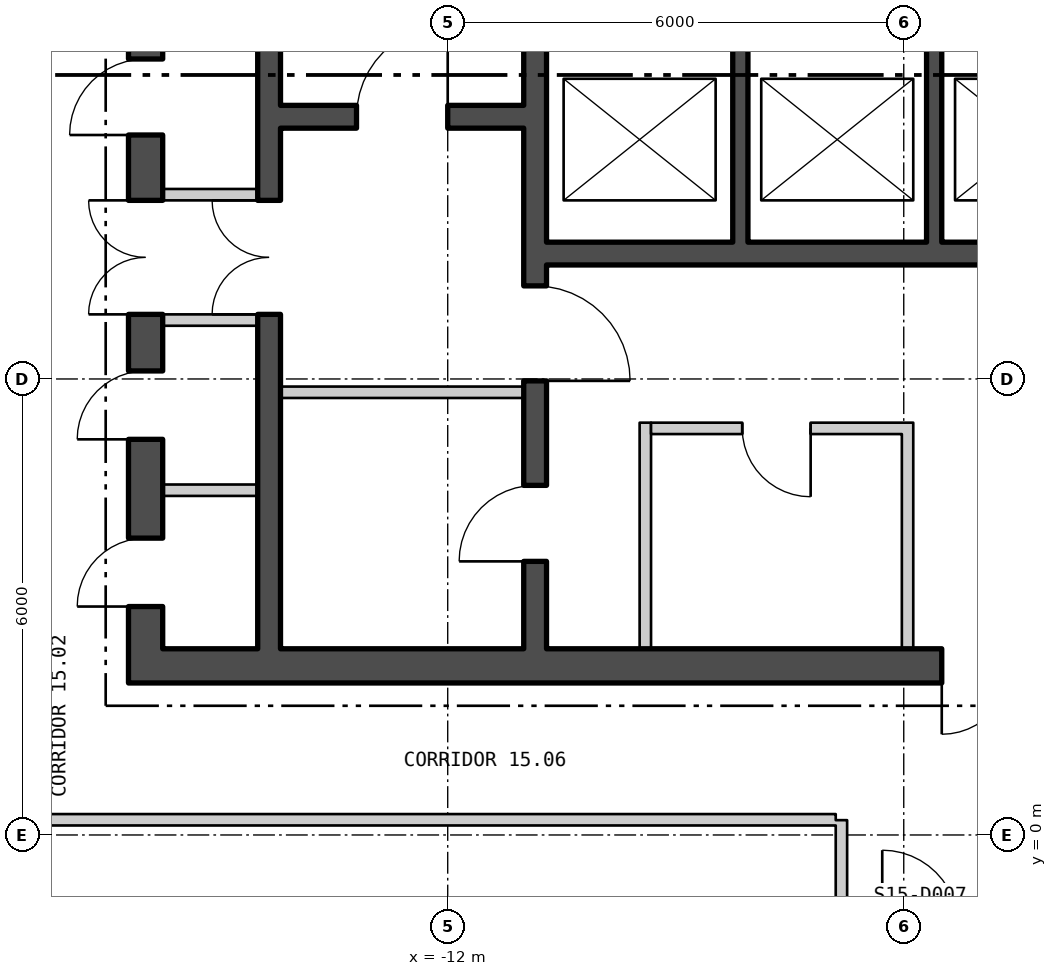
"""IFC4 building model, lengths in metres.
Left out: names, types, materials, properties, quantities, classifications, styles, units other than length and angle.
Written with IfcOpenShell. Run it as: python <this file> out.ifc"""

import sys

from ifc_helpers import new_model, si_unit, direction, frame, frame_2d, origin, place, context, subcontext, project, spatial, polyline, rectangle, outline, extrude, element, fill, save


model = new_model("IFC4")
c1 = context("Model", 3, precision=1e-05, world=origin(), true_north=direction((0.0, 1.0)))
c2 = subcontext(c1, "Body", "Model", "MODEL_VIEW")
j1 = project(units=[si_unit("LENGTHUNIT", "METRE"), si_unit("PLANEANGLEUNIT", "RADIAN")], contexts=[c1])
p1 = place(None, origin())
s1 = spatial("IfcSite", under=j1, at=p1, CompositionType="ELEMENT")
p2 = place(p1, origin())
s2 = spatial("IfcBuilding", under=s1, at=p2, CompositionType="ELEMENT")
p3 = place(p2, frame((0.0, 0.0, 204.3)))
s3 = spatial("IfcBuildingStorey", under=s2, at=p3, CompositionType="ELEMENT", Elevation=204.3)
p4 = place(p3, frame((-26.385, 13.887, -0.18), z_axis=(0.0, 0.0, 1.0), x_axis=(0.499999764979, -0.866025539474, 0.0)))
e1 = element("IfcWall", 1, at=p4, inside=s3, PredefinedType="SOLIDWALL", context=c2, shape_type="SweptSolid", body=[
    extrude(outline(polyline([(-0.13, -0.225), (45.87, -0.225), (45.61, 0.225), (0.13, 0.225), (-0.13, -0.225)])), origin(), (0.0, 0.0, 1.0), 3.68),
])
p5 = place(p4, frame((1.424, 0.0, 1.08)))
e2 = element("IfcOpeningElement", 2, at=p5, cuts=e1, PredefinedType="OPENING", context=c2, shape_type="SweptSolid", body=[
    extrude(rectangle(XDim=2.4, YDim=2.0, at=frame_2d((1.2, 1.0))), frame((0.0, 0.235, 0.0), z_axis=(0.0, -1.0, 0.0), x_axis=(1.0, 0.0, 0.0)), (0.0, 0.0, 1.0), 0.47),
])
p6 = place(p4, frame((5.893, 0.0, 1.08)))
e3 = element("IfcOpeningElement", 3, at=p6, cuts=e1, PredefinedType="OPENING", context=c2, shape_type="SweptSolid", body=[
    extrude(rectangle(XDim=2.4, YDim=2.0, at=frame_2d((1.2, 1.0))), frame((0.0, 0.235, 0.0), z_axis=(0.0, -1.0, 0.0), x_axis=(1.0, 0.0, 0.0)), (0.0, 0.0, 1.0), 0.47),
])
p7 = place(p4, frame((10.401, 0.0, 1.08)))
e4 = element("IfcOpeningElement", 4, at=p7, cuts=e1, PredefinedType="OPENING", context=c2, shape_type="SweptSolid", body=[
    extrude(rectangle(XDim=2.4, YDim=2.0, at=frame_2d((1.2, 1.0))), frame((0.0, 0.235, 0.0), z_axis=(0.0, -1.0, 0.0), x_axis=(1.0, 0.0, 0.0)), (0.0, 0.0, 1.0), 0.47),
])
p8 = place(p4, frame((14.909, 0.0, 1.08)))
e5 = element("IfcOpeningElement", 5, at=p8, cuts=e1, PredefinedType="OPENING", context=c2, shape_type="SweptSolid", body=[
    extrude(rectangle(XDim=2.4, YDim=2.0, at=frame_2d((1.2, 1.0))), frame((0.0, 0.235, 0.0), z_axis=(0.0, -1.0, 0.0), x_axis=(1.0, 0.0, 0.0)), (0.0, 0.0, 1.0), 0.47),
])
p9 = place(p4, frame((19.416, 0.0, 1.08)))
e6 = element("IfcOpeningElement", 6, at=p9, cuts=e1, PredefinedType="OPENING", context=c2, shape_type="SweptSolid", body=[
    extrude(rectangle(XDim=2.4, YDim=2.0, at=frame_2d((1.2, 1.0))), frame((0.0, 0.235, 0.0), z_axis=(0.0, -1.0, 0.0), x_axis=(1.0, 0.0, 0.0)), (0.0, 0.0, 1.0), 0.47),
])
p10 = place(p4, frame((23.924, 0.0, 1.08)))
e7 = element("IfcOpeningElement", 7, at=p10, cuts=e1, PredefinedType="OPENING", context=c2, shape_type="SweptSolid", body=[
    extrude(rectangle(XDim=2.4, YDim=2.0, at=frame_2d((1.2, 1.0))), frame((0.0, 0.235, 0.0), z_axis=(0.0, -1.0, 0.0), x_axis=(1.0, 0.0, 0.0)), (0.0, 0.0, 1.0), 0.47),
])
p11 = place(p4, frame((28.431, 0.0, 1.08)))
e8 = element("IfcOpeningElement", 8, at=p11, cuts=e1, PredefinedType="OPENING", context=c2, shape_type="SweptSolid", body=[
    extrude(rectangle(XDim=2.4, YDim=2.0, at=frame_2d((1.2, 1.0))), frame((0.0, 0.235, 0.0), z_axis=(0.0, -1.0, 0.0), x_axis=(1.0, 0.0, 0.0)), (0.0, 0.0, 1.0), 0.47),
])
p12 = place(p4, frame((32.939, 0.0, 1.08)))
e9 = element("IfcOpeningElement", 9, at=p12, cuts=e1, PredefinedType="OPENING", context=c2, shape_type="SweptSolid", body=[
    extrude(rectangle(XDim=2.4, YDim=2.0, at=frame_2d((1.2, 1.0))), frame((0.0, 0.235, 0.0), z_axis=(0.0, -1.0, 0.0), x_axis=(1.0, 0.0, 0.0)), (0.0, 0.0, 1.0), 0.47),
])
p13 = place(p4, frame((41.916, 0.0, 1.08)))
e10 = element("IfcOpeningElement", 10, at=p13, cuts=e1, PredefinedType="OPENING", context=c2, shape_type="SweptSolid", body=[
    extrude(rectangle(XDim=2.4, YDim=2.0, at=frame_2d((1.2, 1.0))), frame((0.0, 0.235, 0.0), z_axis=(0.0, -1.0, 0.0), x_axis=(1.0, 0.0, 0.0)), (0.0, 0.0, 1.0), 0.47),
])
p14 = place(p3, frame((-16.2, 2.225, 0.0), z_axis=(0.0, 0.0, 1.0), x_axis=(1.0, 0.0, 0.0)))
e11 = element("IfcWall", 11, at=p14, inside=s3, PredefinedType="SHEAR", context=c2, shape_type="SweptSolid", body=[
    extrude(rectangle(XDim=32.4, YDim=0.45, at=frame_2d((16.2, 0.0))), origin(), (0.0, 0.0, 1.0), 3.7),
])
p15 = place(p14, frame((10.7, 0.0, 0.0)))
e12 = element("IfcOpeningElement", 12, at=p15, cuts=e11, PredefinedType="OPENING", context=c2, shape_type="SweptSolid", body=[
    extrude(rectangle(XDim=1.8, YDim=2.4, at=frame_2d((0.9, 1.2))), frame((0.0, 0.235, 0.0), z_axis=(0.0, -1.0, 0.0), x_axis=(1.0, 0.0, 0.0)), (0.0, 0.0, 1.0), 0.47),
])
p16 = place(p14, frame((20.7, 0.0, 0.0)))
e13 = element("IfcOpeningElement", 13, at=p16, cuts=e11, PredefinedType="OPENING", context=c2, shape_type="SweptSolid", body=[
    extrude(rectangle(XDim=1.8, YDim=2.4, at=frame_2d((0.9, 1.2))), frame((0.0, 0.235, 0.0), z_axis=(0.0, -1.0, 0.0), x_axis=(1.0, 0.0, 0.0)), (0.0, 0.0, 1.0), 0.47),
])
p17 = place(p3, frame((-15.975, 2.45, 0.0), z_axis=(0.0, 0.0, 1.0), x_axis=(0.0, 1.0, 0.0)))
e14 = element("IfcWall", 14, at=p17, inside=s3, PredefinedType="SHEAR", context=c2, shape_type="SweptSolid", body=[
    extrude(rectangle(XDim=15.1, YDim=0.45, at=frame_2d((7.55, 0.0))), origin(), (0.0, 0.0, 1.0), 3.7),
])
p18 = place(p17, frame((4.4, 0.0, 0.0)))
e15 = element("IfcOpeningElement", 15, at=p18, cuts=e14, PredefinedType="OPENING", context=c2, shape_type="SweptSolid", body=[
    extrude(rectangle(XDim=1.5, YDim=2.1, at=frame_2d((0.75, 1.05))), frame((0.0, 0.235, 0.0), z_axis=(0.0, -1.0, 0.0), x_axis=(1.0, 0.0, 0.0)), (0.0, 0.0, 1.0), 0.47),
])
p19 = place(p17, frame((0.556, 0.0, 0.0)))
e16 = element("IfcOpeningElement", 16, at=p19, cuts=e14, PredefinedType="OPENING", context=c2, shape_type="SweptSolid", body=[
    extrude(rectangle(XDim=0.9, YDim=2.1, at=frame_2d((0.45, 1.05))), frame((0.0, 0.235, 0.0), z_axis=(0.0, -1.0, 0.0), x_axis=(1.0, 0.0, 0.0)), (0.0, 0.0, 1.0), 0.47),
])
p20 = place(p17, frame((2.756, 0.0, 0.0)))
e17 = element("IfcOpeningElement", 17, at=p20, cuts=e14, PredefinedType="OPENING", context=c2, shape_type="SweptSolid", body=[
    extrude(rectangle(XDim=0.9, YDim=2.1, at=frame_2d((0.45, 1.05))), frame((0.0, 0.235, 0.0), z_axis=(0.0, -1.0, 0.0), x_axis=(1.0, 0.0, 0.0)), (0.0, 0.0, 1.0), 0.47),
])
p21 = place(p17, frame((6.76, 0.0, 0.0)))
e18 = element("IfcOpeningElement", 18, at=p21, cuts=e14, PredefinedType="OPENING", context=c2, shape_type="SweptSolid", body=[
    extrude(rectangle(XDim=1.0, YDim=2.1, at=frame_2d((0.5, 1.05))), frame((0.0, 0.235, 0.0), z_axis=(0.0, -1.0, 0.0), x_axis=(1.0, 0.0, 0.0)), (0.0, 0.0, 1.0), 0.47),
])
p22 = place(p17, frame((10.032, 0.0, 0.0)))
e19 = element("IfcOpeningElement", 19, at=p22, cuts=e14, PredefinedType="OPENING", context=c2, shape_type="SweptSolid", body=[
    extrude(rectangle(XDim=0.9, YDim=2.1, at=frame_2d((0.45, 1.05))), frame((0.0, 0.235, 0.0), z_axis=(0.0, -1.0, 0.0), x_axis=(1.0, 0.0, 0.0)), (0.0, 0.0, 1.0), 0.47),
])
p23 = place(p17, frame((13.347, 0.0, 0.0)))
e20 = element("IfcOpeningElement", 20, at=p23, cuts=e14, PredefinedType="OPENING", context=c2, shape_type="SweptSolid", body=[
    extrude(rectangle(XDim=0.9, YDim=2.1, at=frame_2d((0.45, 1.05))), frame((0.0, 0.235, 0.0), z_axis=(0.0, -1.0, 0.0), x_axis=(1.0, 0.0, 0.0)), (0.0, 0.0, 1.0), 0.47),
])
p24 = place(p3, frame((-10.85, 2.45, 0.0), z_axis=(0.0, 0.0, 1.0), x_axis=(0.0, 1.0, 0.0)))
e21 = element("IfcWall", 21, at=p24, inside=s3, PredefinedType="SHEAR", context=c2, shape_type="SweptSolid", body=[
    extrude(rectangle(XDim=15.1, YDim=0.3, at=frame_2d((7.55, 0.0))), origin(), (0.0, 0.0, 1.0), 3.7),
])
p25 = place(p24, frame((3.525, 0.0, 0.0)))
e22 = element("IfcOpeningElement", 22, at=p25, cuts=e21, PredefinedType="OPENING", context=c2, shape_type="SweptSolid", body=[
    extrude(rectangle(XDim=1.25, YDim=2.1, at=frame_2d((0.625, 1.05))), frame((0.0, 0.16, 0.0), z_axis=(0.0, -1.0, 0.0), x_axis=(1.0, 0.0, 0.0)), (0.0, 0.0, 1.0), 0.32),
])
p26 = place(p24, frame((1.15, 0.0, 0.0)))
e23 = element("IfcOpeningElement", 23, at=p26, cuts=e21, PredefinedType="OPENING", context=c2, shape_type="SweptSolid", body=[
    extrude(rectangle(XDim=1.0, YDim=2.1, at=frame_2d((0.5, 1.05))), frame((0.0, 0.16, 0.0), z_axis=(0.0, -1.0, 0.0), x_axis=(1.0, 0.0, 0.0)), (0.0, 0.0, 1.0), 0.32),
])
p27 = place(p3, frame((-14.35, 2.45, 0.0), z_axis=(0.0, 0.0, 1.0), x_axis=(0.0, 1.0, 0.0)))
e24 = element("IfcWall", 24, at=p27, inside=s3, PredefinedType="SHEAR", context=c2, shape_type="SweptSolid", body=[
    extrude(rectangle(XDim=15.1, YDim=0.3, at=frame_2d((7.55, 0.0))), origin(), (0.0, 0.0, 1.0), 3.7),
])
p28 = place(p27, frame((4.4, 0.0, 0.0)))
e25 = element("IfcOpeningElement", 25, at=p28, cuts=e24, PredefinedType="OPENING", context=c2, shape_type="SweptSolid", body=[
    extrude(rectangle(XDim=1.5, YDim=2.1, at=frame_2d((0.75, 1.05))), frame((0.0, 0.16, 0.0), z_axis=(0.0, -1.0, 0.0), x_axis=(1.0, 0.0, 0.0)), (0.0, 0.0, 1.0), 0.32),
])
p29 = place(p3, frame((-14.2, 9.45, 0.0), z_axis=(0.0, 0.0, 1.0), x_axis=(1.0, 0.0, 0.0)))
e26 = element("IfcWall", 26, at=p29, inside=s3, PredefinedType="SHEAR", context=c2, shape_type="SweptSolid", body=[
    extrude(rectangle(XDim=3.2, YDim=0.3, at=frame_2d((1.6, 0.0))), origin(), (0.0, 0.0, 1.0), 3.7),
])
p30 = place(p29, frame((1.0, 0.0, 0.0)))
e27 = element("IfcOpeningElement", 27, at=p30, cuts=e26, PredefinedType="OPENING", context=c2, shape_type="SweptSolid", body=[
    extrude(rectangle(XDim=1.2, YDim=2.1, at=frame_2d((0.6, 1.05))), frame((0.0, 0.16, 0.0), z_axis=(0.0, -1.0, 0.0), x_axis=(1.0, 0.0, 0.0)), (0.0, 0.0, 1.0), 0.32),
])
p31 = place(p3, frame((-10.7, 7.65, 0.0), z_axis=(0.0, 0.0, 1.0), x_axis=(1.0, 0.0, 0.0)))
e28 = element("IfcWall", 28, at=p31, inside=s3, PredefinedType="SHEAR", context=c2, shape_type="SweptSolid", body=[
    extrude(rectangle(XDim=10.3, YDim=0.3, at=frame_2d((5.15, 0.0))), origin(), (0.0, 0.0, 1.0), 3.7),
])
for number, where, z_axis, x_axis in (
    (29, (-8.15, 7.8, 0.0), (0.0, 0.0, 1.0), (0.0, 1.0, 0.0)),
    (30, (-5.6, 7.8, 0.0), (0.0, 0.0, 1.0), (0.0, 1.0, 0.0)),
):
    element("IfcWall", number, at=place(p3, frame(where, z_axis=z_axis, x_axis=x_axis)), inside=s3, PredefinedType="SHEAR", context=c2, shape_type="SweptSolid", body=[
        extrude(rectangle(XDim=2.7, YDim=0.2, at=frame_2d((1.35, 0.0))), origin(), (0.0, 0.0, 1.0), 3.7),
    ])
p32 = place(p3, frame((-14.2, 5.825, 0.0), z_axis=(0.0, 0.0, 1.0), x_axis=(1.0, 0.0, 0.0)))
e31 = element("IfcWall", 31, at=p32, inside=s3, PredefinedType="PARTITIONING", context=c2, shape_type="SweptSolid", body=[
    extrude(rectangle(XDim=3.2, YDim=0.15, at=frame_2d((1.6, 0.0))), origin(), (0.0, 0.0, 1.0), 3.7),
])
for number, where, z_axis, x_axis in (
    (32, (-15.75, 6.775, 0.0), (0.0, 0.0, 1.0), (1.0, 0.0, 0.0)),
    (33, (-15.75, 8.425, 0.0), (0.0, 0.0, 1.0), (1.0, 0.0, 0.0)),
    (34, (-15.75, 4.536, 0.0), (0.0, 0.0, 1.0), (1.0, 0.0, 0.0)),
):
    element("IfcWall", number, at=place(p3, frame(where, z_axis=z_axis, x_axis=x_axis)), inside=s3, PredefinedType="PARTITIONING", context=c2, shape_type="SweptSolid", body=[
        extrude(rectangle(XDim=1.25, YDim=0.15, at=frame_2d((0.625, 0.0))), origin(), (0.0, 0.0, 1.0), 3.7),
    ])
for number, where, z_axis, x_axis in (
    (35, (-9.4, 2.45, 0.0), (0.0, 0.0, 1.0), (0.0, 1.0, 0.0)),
    (36, (-5.95, 2.45, 0.0), (0.0, 0.0, 1.0), (0.0, 1.0, 0.0)),
):
    element("IfcWall", number, at=place(p3, frame(where, z_axis=z_axis, x_axis=x_axis)), inside=s3, PredefinedType="PARTITIONING", context=c2, shape_type="SweptSolid", body=[
        extrude(rectangle(XDim=2.975, YDim=0.15, at=frame_2d((1.488, 0.0))), origin(), (0.0, 0.0, 1.0), 3.7),
    ])
p33 = place(p3, frame((-9.325, 5.35, 0.0), z_axis=(0.0, 0.0, 1.0), x_axis=(1.0, 0.0, 0.0)))
e37 = element("IfcWall", 37, at=p33, inside=s3, PredefinedType="PARTITIONING", context=c2, shape_type="SweptSolid", body=[
    extrude(rectangle(XDim=3.3, YDim=0.15, at=frame_2d((1.65, 0.0))), origin(), (0.0, 0.0, 1.0), 3.7),
])
p34 = place(p33, frame((1.2, 0.0, 0.0)))
e38 = element("IfcOpeningElement", 38, at=p34, cuts=e37, PredefinedType="OPENING", context=c2, shape_type="SweptSolid", body=[
    extrude(rectangle(XDim=0.9, YDim=2.1, at=frame_2d((0.45, 1.05))), frame((0.0, 0.085, 0.0), z_axis=(0.0, -1.0, 0.0), x_axis=(1.0, 0.0, 0.0)), (0.0, 0.0, 1.0), 0.17),
])
p35 = place(p3, frame((-17.925, 0.2, 0.0), z_axis=(0.0, 0.0, 1.0), x_axis=(1.0, 0.0, 0.0)))
e39 = element("IfcWall", 39, at=p35, inside=s3, PredefinedType="PARTITIONING", context=c2, shape_type="SweptSolid", body=[
    extrude(rectangle(XDim=11.03, YDim=0.15, at=frame_2d((5.515, 0.0))), origin(), (0.0, 0.0, 1.0), 3.7),
])
p36 = place(p3, frame((-6.82, -3.412, 0.0), z_axis=(0.0, 0.0, 1.0), x_axis=(0.0, 1.0, 0.0)))
e40 = element("IfcWall", 40, at=p36, inside=s3, PredefinedType="PARTITIONING", context=c2, shape_type="SweptSolid", body=[
    extrude(rectangle(XDim=3.607, YDim=0.15, at=frame_2d((1.804, 0.0))), origin(), (0.0, 0.0, 1.0), 3.7),
])
p37 = place(p30, origin())
e41 = element("IfcDoor", 41, at=p37, inside=s3, OperationType="SINGLE_SWING_LEFT", PredefinedType="DOOR", context=c2, shape_type="SweptSolid", body=[
    extrude(rectangle(XDim=1.2, YDim=2.1, at=frame_2d((0.6, 1.05))), frame((0.0, 0.025, 0.0), z_axis=(0.0, -1.0, 0.0), x_axis=(1.0, 0.0, 0.0)), (0.0, 0.0, 1.0), 0.05),
])
fill(e27, e41)
p38 = place(p25, origin())
e42 = element("IfcDoor", 42, at=p38, inside=s3, OperationType="SINGLE_SWING_LEFT", PredefinedType="DOOR", context=c2, shape_type="SweptSolid", body=[
    extrude(rectangle(XDim=1.25, YDim=2.1, at=frame_2d((0.625, 1.05))), frame((0.0, 0.025, 0.0), z_axis=(0.0, -1.0, 0.0), x_axis=(1.0, 0.0, 0.0)), (0.0, 0.0, 1.0), 0.05),
])
fill(e22, e42)
p39 = place(p26, origin())
e43 = element("IfcDoor", 43, at=p39, inside=s3, OperationType="SINGLE_SWING_RIGHT", PredefinedType="DOOR", context=c2, shape_type="SweptSolid", body=[
    extrude(rectangle(XDim=1.0, YDim=2.1, at=frame_2d((0.5, 1.05))), frame((0.0, 0.025, 0.0), z_axis=(0.0, -1.0, 0.0), x_axis=(1.0, 0.0, 0.0)), (0.0, 0.0, 1.0), 0.05),
])
fill(e23, e43)
p40 = place(p28, origin())
e44 = element("IfcDoor", 44, at=p40, inside=s3, OperationType="DOUBLE_DOOR_SINGLE_SWING", PredefinedType="DOOR", context=c2, shape_type="SweptSolid", body=[
    extrude(rectangle(XDim=1.5, YDim=2.1, at=frame_2d((0.75, 1.05))), frame((0.0, 0.025, 0.0), z_axis=(0.0, -1.0, 0.0), x_axis=(1.0, 0.0, 0.0)), (0.0, 0.0, 1.0), 0.05),
])
fill(e25, e44)
p41 = place(p18, origin())
e45 = element("IfcDoor", 45, at=p41, inside=s3, OperationType="DOUBLE_DOOR_SINGLE_SWING", PredefinedType="DOOR", context=c2, shape_type="SweptSolid", body=[
    extrude(rectangle(XDim=1.5, YDim=2.1, at=frame_2d((0.75, 1.05))), frame((0.0, 0.025, 0.0), z_axis=(0.0, -1.0, 0.0), x_axis=(1.0, 0.0, 0.0)), (0.0, 0.0, 1.0), 0.05),
])
fill(e15, e45)
p42 = place(p19, origin())
e46 = element("IfcDoor", 46, at=p42, inside=s3, OperationType="SINGLE_SWING_RIGHT", PredefinedType="DOOR", context=c2, shape_type="SweptSolid", body=[
    extrude(rectangle(XDim=0.9, YDim=2.1, at=frame_2d((0.45, 1.05))), frame((0.0, 0.025, 0.0), z_axis=(0.0, -1.0, 0.0), x_axis=(1.0, 0.0, 0.0)), (0.0, 0.0, 1.0), 0.05),
])
fill(e16, e46)
p43 = place(p20, origin())
e47 = element("IfcDoor", 47, at=p43, inside=s3, OperationType="SINGLE_SWING_RIGHT", PredefinedType="DOOR", context=c2, shape_type="SweptSolid", body=[
    extrude(rectangle(XDim=0.9, YDim=2.1, at=frame_2d((0.45, 1.05))), frame((0.0, 0.025, 0.0), z_axis=(0.0, -1.0, 0.0), x_axis=(1.0, 0.0, 0.0)), (0.0, 0.0, 1.0), 0.05),
])
fill(e17, e47)
p44 = place(p21, origin())
e48 = element("IfcDoor", 48, at=p44, inside=s3, OperationType="SINGLE_SWING_RIGHT", PredefinedType="DOOR", context=c2, shape_type="SweptSolid", body=[
    extrude(rectangle(XDim=1.0, YDim=2.1, at=frame_2d((0.5, 1.05))), frame((0.0, 0.025, 0.0), z_axis=(0.0, -1.0, 0.0), x_axis=(1.0, 0.0, 0.0)), (0.0, 0.0, 1.0), 0.05),
])
fill(e18, e48)
p45 = place(p34, origin())
e49 = element("IfcDoor", 49, at=p45, inside=s3, OperationType="SINGLE_SWING_RIGHT", PredefinedType="DOOR", context=c2, shape_type="SweptSolid", body=[
    extrude(rectangle(XDim=0.9, YDim=2.1, at=frame_2d((0.45, 1.05))), frame((0.0, 0.025, 0.0), z_axis=(0.0, -1.0, 0.0), x_axis=(1.0, 0.0, 0.0)), (0.0, 0.0, 1.0), 0.05),
])
fill(e38, e49)
p46 = place(p15, origin())
e50 = element("IfcDoor", 50, at=p46, inside=s3, OperationType="DOUBLE_DOOR_SINGLE_SWING", PredefinedType="DOOR", context=c2, shape_type="SweptSolid", body=[
    extrude(rectangle(XDim=1.8, YDim=2.4, at=frame_2d((0.9, 1.2))), frame((0.0, 0.025, 0.0), z_axis=(0.0, -1.0, 0.0), x_axis=(1.0, 0.0, 0.0)), (0.0, 0.0, 1.0), 0.05),
])
fill(e12, e50)
save(model, sys.argv[1])
